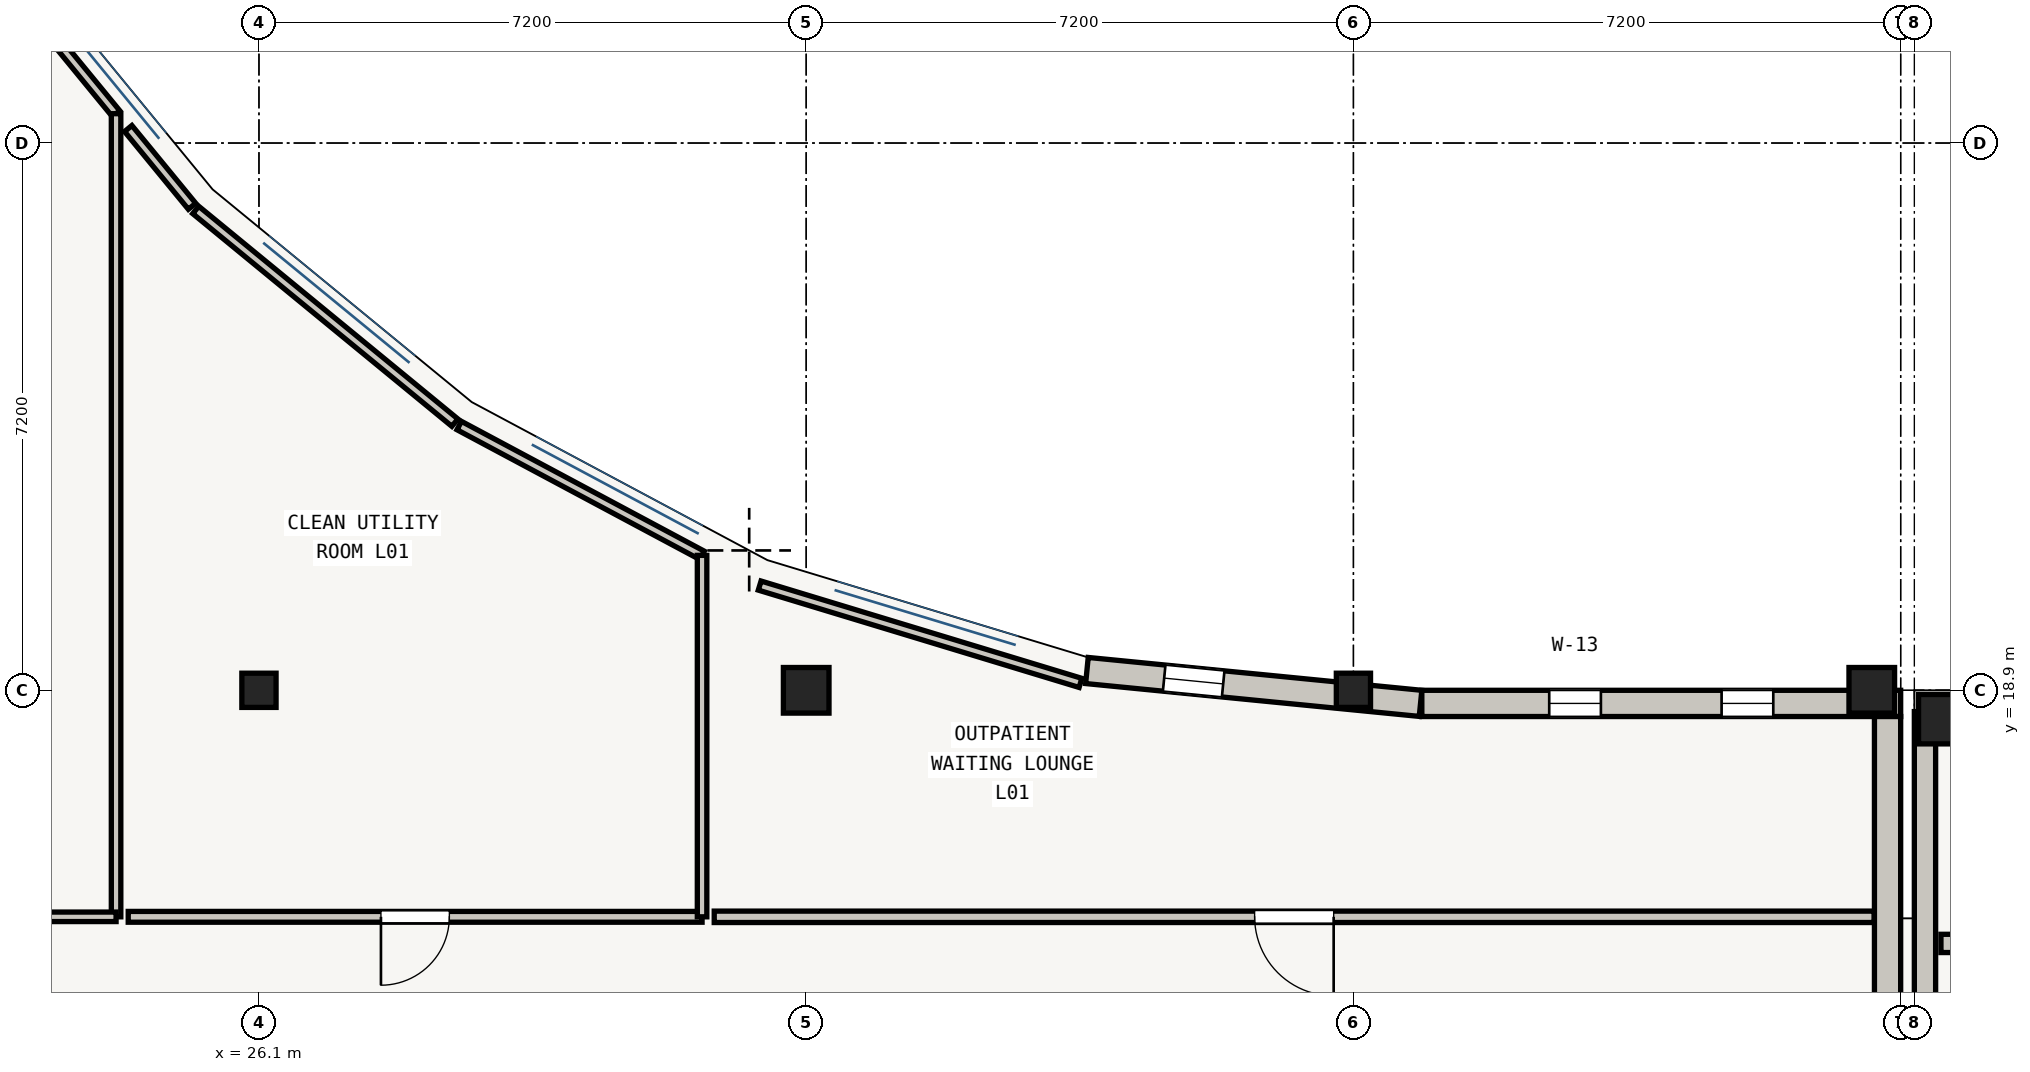
"""IFC4 building model, lengths in metres.
Left out: names, types, materials, properties, quantities, classifications, styles, units other than length and angle.
Written with IfcOpenShell. Run it as: python <this file> out.ifc"""

import sys

from ifc_helpers import new_model, si_unit, direction, frame, frame_2d, origin, origin_2d, place, context, subcontext, project, spatial, rectangle, extrude, element, fill, save


model = new_model("IFC4")
c1 = context("Model", 3, precision=1e-05, world=origin(), true_north=direction((0.0, 1.0)))
c2 = subcontext(c1, "Body", "Model", "MODEL_VIEW")
j1 = project(units=[si_unit("LENGTHUNIT", "METRE"), si_unit("PLANEANGLEUNIT", "RADIAN")], contexts=[c1])
p1 = place(None, origin())
s1 = spatial("IfcSite", under=j1, at=p1, CompositionType="ELEMENT")
p2 = place(p1, origin())
s2 = spatial("IfcBuilding", under=s1, at=p2, CompositionType="ELEMENT")
p3 = place(p2, frame((0.0, 0.0, 4.5)))
s3 = spatial("IfcBuildingStorey", under=s2, at=p3, CompositionType="ELEMENT", Elevation=4.5)
p4 = place(p3, frame((26.1, 18.9, 0.0), z_axis=(0.0, 0.0, 1.0), x_axis=(1.0, 0.0, 0.0)))
e1 = element("IfcColumn", 1, at=p4, inside=s3, PredefinedType="COLUMN", context=c2, shape_type="SweptSolid", body=[
    extrude(rectangle(XDim=0.45, YDim=0.45, at=origin_2d()), origin(), (0.0, 0.0, 1.0), 3.92),
])
p5 = place(p3, frame((33.3, 18.9, 0.0), z_axis=(0.0, 0.0, 1.0), x_axis=(1.0, 0.0, 0.0)))
e2 = element("IfcColumn", 2, at=p5, inside=s3, PredefinedType="COLUMN", context=c2, shape_type="SweptSolid", body=[
    extrude(rectangle(XDim=0.6, YDim=0.6, at=origin_2d()), origin(), (0.0, 0.0, 1.0), 3.92),
])
p6 = place(p3, frame((40.5, 18.9, 0.0), z_axis=(0.0, 0.0, 1.0), x_axis=(1.0, 0.0, 0.0)))
e3 = element("IfcColumn", 3, at=p6, inside=s3, PredefinedType="COLUMN", context=c2, shape_type="SweptSolid", body=[
    extrude(rectangle(XDim=0.45, YDim=0.45, at=origin_2d()), origin(), (0.0, 0.0, 1.0), 3.92),
])
p7 = place(p3, frame((47.32, 18.9, 0.0), z_axis=(0.0, 0.0, 1.0), x_axis=(1.0, 0.0, 0.0)))
e4 = element("IfcColumn", 4, at=p7, inside=s3, PredefinedType="COLUMN", context=c2, shape_type="SweptSolid", body=[
    extrude(rectangle(XDim=0.6, YDim=0.6, at=origin_2d()), origin(), (0.0, 0.0, 1.0), 3.92),
])
p8 = place(p3, frame((48.26, 18.52, 0.0), z_axis=(0.0, 0.0, 1.0), x_axis=(1.0, 0.0, 0.0)))
e5 = element("IfcColumn", 5, at=p8, inside=s3, PredefinedType="COLUMN", context=c2, shape_type="SweptSolid", body=[
    extrude(rectangle(XDim=0.65, YDim=0.65, at=origin_2d()), origin(), (0.0, 0.0, 1.0), 3.96),
])
p9 = place(p3, frame((36.994, 19.161, 0.0), z_axis=(0.0, 0.0, 1.0), x_axis=(0.995183522218, -0.098029368588, 0.0)))
e6 = element("IfcWall", 6, at=p9, inside=s3, PredefinedType="SOLIDWALL", context=c2, shape_type="SweptSolid", body=[
    extrude(rectangle(XDim=4.411, YDim=0.345, at=frame_2d((2.205, 0.0))), origin(), (0.0, 0.0, 1.0), 2.955),
])
p10 = place(p9, frame((1.021, 0.0, 0.6)))
e7 = element("IfcOpeningElement", 7, at=p10, cuts=e6, PredefinedType="OPENING", context=c2, shape_type="SweptSolid", body=[
    extrude(rectangle(XDim=0.78, YDim=1.95, at=frame_2d((0.39, 0.975))), frame((0.0, 0.172, 0.0), z_axis=(0.0, -1.0, 0.0), x_axis=(1.0, 0.0, 0.0)), (0.0, 0.0, 1.0), 0.345),
])
p11 = place(p3, frame((41.4, 18.728, 0.0), z_axis=(0.0, 0.0, 1.0), x_axis=(1.0, 0.0, 0.0)))
e8 = element("IfcWall", 8, at=p11, inside=s3, PredefinedType="SOLIDWALL", context=c2, shape_type="SweptSolid", body=[
    extrude(rectangle(XDim=6.3, YDim=0.345, at=frame_2d((3.15, 0.0))), origin(), (0.0, 0.0, 1.0), 3.355),
])
p12 = place(p11, frame((1.676, 0.0, 0.55)))
e9 = element("IfcOpeningElement", 9, at=p12, cuts=e8, PredefinedType="OPENING", context=c2, shape_type="SweptSolid", body=[
    extrude(rectangle(XDim=0.68, YDim=2.22, at=frame_2d((0.34, 1.11))), frame((0.0, 0.172, 0.0), z_axis=(0.0, -1.0, 0.0), x_axis=(1.0, 0.0, 0.0)), (0.0, 0.0, 1.0), 0.345),
])
p13 = place(p11, frame((3.944, 0.0, 0.55)))
e10 = element("IfcOpeningElement", 10, at=p13, cuts=e8, PredefinedType="OPENING", context=c2, shape_type="SweptSolid", body=[
    extrude(rectangle(XDim=0.68, YDim=2.22, at=frame_2d((0.34, 1.11))), frame((0.0, 0.172, 0.0), z_axis=(0.0, -1.0, 0.0), x_axis=(1.0, 0.0, 0.0)), (0.0, 0.0, 1.0), 0.345),
])
p14 = place(p3, frame((47.528, 18.555, 0.0), z_axis=(0.0, 0.0, 1.0), x_axis=(0.0, -1.0, 0.0)))
e11 = element("IfcWall", 11, at=p14, inside=s3, PredefinedType="SOLIDWALL", context=c2, shape_type="SweptSolid", body=[
    extrude(rectangle(XDim=6.855, YDim=0.345, at=frame_2d((3.427, 0.0))), origin(), (0.0, 0.0, 1.0), 3.325),
])
p15 = place(p3, frame((48.02, 11.7, 0.0), z_axis=(0.0, 0.0, 1.0), x_axis=(0.0, 1.0, 0.0)))
e12 = element("IfcWall", 12, at=p15, inside=s3, PredefinedType="STANDARD", context=c2, shape_type="SweptSolid", body=[
    extrude(rectangle(XDim=6.92, YDim=0.28, at=frame_2d((3.46, 0.0))), origin(), (0.0, 0.0, 1.0), 3.995),
])
p16 = place(p3, frame((22.421, 28.678, 0.0), z_axis=(0.0, 0.0, 1.0), x_axis=(0.634381268995, -0.773020313801, 0.0)))
e13 = element("IfcWall", 13, at=p16, inside=s3, PredefinedType="PARTITIONING", context=c2, shape_type="SweptSolid", body=[
    extrude(rectangle(XDim=2.835, YDim=0.125, at=frame_2d((1.417, 0.0))), origin(), (0.0, 0.0, 1.0), 2.94),
])
p17 = place(p3, frame((24.22, 26.486, 0.0), z_axis=(0.0, 0.0, 1.0), x_axis=(0.0, -1.0, 0.0)))
e14 = element("IfcWall", 14, at=p17, inside=s3, PredefinedType="PARTITIONING", context=c2, shape_type="SweptSolid", body=[
    extrude(rectangle(XDim=10.566, YDim=0.125, at=frame_2d((5.283, 0.0))), origin(), (0.0, 0.0, 1.0), 2.94),
])
p18 = place(p3, frame((24.22, 15.92, 0.0), z_axis=(0.0, 0.0, 1.0), x_axis=(-1.0, 0.0, 0.0)))
e15 = element("IfcWall", 15, at=p18, inside=s3, PredefinedType="PARTITIONING", context=c2, shape_type="SweptSolid", body=[
    extrude(rectangle(XDim=7.55, YDim=0.125, at=frame_2d((3.775, 0.0))), origin(), (0.0, 0.0, 1.0), 2.94),
])
p19 = place(p3, frame((31.93, 15.92, 0.0), z_axis=(0.0, 0.0, 1.0), x_axis=(-1.0, 0.0, 0.0)))
e16 = element("IfcWall", 16, at=p19, inside=s3, PredefinedType="PARTITIONING", context=c2, shape_type="SweptSolid", body=[
    extrude(rectangle(XDim=7.55, YDim=0.142, at=frame_2d((3.775, 0.0))), origin(), (0.0, 0.0, 1.0), 2.94),
])
p20 = place(p19, frame((3.325, 0.0, 0.0)))
e17 = element("IfcOpeningElement", 17, at=p20, cuts=e16, PredefinedType="OPENING", context=c2, shape_type="SweptSolid", body=[
    extrude(rectangle(XDim=0.9, YDim=2.05, at=frame_2d((0.45, 1.025))), frame((0.0, 0.071, 0.0), z_axis=(0.0, -1.0, 0.0), x_axis=(1.0, 0.0, 0.0)), (0.0, 0.0, 1.0), 0.142),
])
p21 = place(p3, frame((25.268, 25.219, 0.0), z_axis=(0.0, 0.0, 1.0), x_axis=(0.773026739032, -0.634373439499, 0.0)))
e18 = element("IfcWall", 18, at=p21, inside=s3, PredefinedType="PARTITIONING", context=c2, shape_type="SweptSolid", body=[
    extrude(rectangle(XDim=4.411, YDim=0.125, at=frame_2d((2.206, 0.0))), origin(), (0.0, 0.0, 1.0), 2.94),
])
p22 = place(p3, frame((28.735, 22.383, 0.0), z_axis=(0.0, 0.0, 1.0), x_axis=(0.881912348796, -0.471413416273, 0.0)))
e19 = element("IfcWall", 19, at=p22, inside=s3, PredefinedType="PARTITIONING", context=c2, shape_type="SweptSolid", body=[
    extrude(rectangle(XDim=3.623, YDim=0.125, at=frame_2d((1.812, 0.0))), origin(), (0.0, 0.0, 1.0), 2.94),
])
p23 = place(p3, frame((31.93, 20.675, 0.0), z_axis=(0.0, 0.0, 1.0), x_axis=(0.0, -1.0, 0.0)))
e20 = element("IfcWall", 20, at=p23, inside=s3, PredefinedType="PARTITIONING", context=c2, shape_type="SweptSolid", body=[
    extrude(rectangle(XDim=4.755, YDim=0.125, at=frame_2d((2.378, 0.0))), origin(), (0.0, 0.0, 1.0), 2.94),
])
p24 = place(p3, frame((24.38, 26.291, 0.0), z_axis=(0.0, 0.0, 1.0), x_axis=(0.634432512687, -0.77297825768, 0.0)))
e21 = element("IfcWall", 21, at=p24, inside=s3, PredefinedType="PARTITIONING", context=c2, shape_type="SweptSolid", body=[
    extrude(rectangle(XDim=1.323, YDim=0.125, at=frame_2d((0.662, 0.0))), origin(), (0.0, 0.0, 1.0), 2.94),
])
p25 = place(p3, frame((47.35, 15.92, 0.0), z_axis=(0.0, 0.0, 1.0), x_axis=(-1.0, 0.0, 0.0)))
e22 = element("IfcWall", 22, at=p25, inside=s3, PredefinedType="PARTITIONING", context=c2, shape_type="SweptSolid", body=[
    extrude(rectangle(XDim=15.26, YDim=0.15, at=frame_2d((7.63, 0.0))), origin(), (0.0, 0.0, 1.0), 2.94),
])
p26 = place(p25, frame((7.11, 0.0, 0.0)))
e23 = element("IfcOpeningElement", 23, at=p26, cuts=e22, PredefinedType="OPENING", context=c2, shape_type="SweptSolid", body=[
    extrude(rectangle(XDim=1.04, YDim=2.05, at=frame_2d((0.52, 1.025))), frame((0.0, 0.075, 0.0), z_axis=(0.0, -1.0, 0.0), x_axis=(1.0, 0.0, 0.0)), (0.0, 0.0, 1.0), 0.15),
])
p27 = place(p3, frame((32.688, 20.278, 0.0), z_axis=(0.0, 0.0, 1.0), x_axis=(0.956933582882, -0.290306937487, 0.0)))
e24 = element("IfcWall", 24, at=p27, inside=s3, PredefinedType="PARTITIONING", context=c2, shape_type="SweptSolid", body=[
    extrude(rectangle(XDim=4.411, YDim=0.125, at=frame_2d((2.206, 0.0))), origin(), (0.0, 0.0, 1.0), 2.94),
])
p28 = place(p3, frame((76.6, 15.57, 0.0), z_axis=(0.0, 0.0, 1.0), x_axis=(-1.0, 0.0, 0.0)))
e25 = element("IfcWall", 25, at=p28, inside=s3, PredefinedType="SOLIDWALL", context=c2, shape_type="SweptSolid", body=[
    extrude(rectangle(XDim=28.37, YDim=0.24, at=frame_2d((14.185, 0.0))), origin(), (0.0, 0.0, 1.0), 2.905),
])
p29 = place(p28, frame((13.51, 0.0, 0.0)))
e26 = element("IfcOpeningElement", 26, at=p29, cuts=e25, PredefinedType="OPENING", context=c2, shape_type="SweptSolid", body=[
    extrude(rectangle(XDim=1.35, YDim=2.1, at=frame_2d((0.675, 1.05))), frame((0.0, 0.12, 0.0), z_axis=(0.0, -1.0, 0.0), x_axis=(1.0, 0.0, 0.0)), (0.0, 0.0, 1.0), 0.24),
])
p30 = place(p3, frame((48.23, 18.55, 0.0), z_axis=(0.0, 0.0, 1.0), x_axis=(1.0, 0.0, 0.0)))
e27 = element("IfcWall", 27, at=p30, inside=s3, PredefinedType="PARTITIONING", context=c2, shape_type="SweptSolid", body=[
    extrude(rectangle(XDim=28.37, YDim=0.125, at=frame_2d((14.185, 0.0))), origin(), (0.0, 0.0, 1.0), 2.905),
])
p31 = place(p10, origin())
e28 = element("IfcWindow", 28, at=p31, inside=s3, PartitioningType="SINGLE_PANEL", PredefinedType="WINDOW", context=c2, shape_type="SweptSolid", body=[
    extrude(rectangle(XDim=0.78, YDim=1.95, at=frame_2d((0.39, 0.975))), frame((0.0, 0.03, 0.0), z_axis=(0.0, -1.0, 0.0), x_axis=(1.0, 0.0, 0.0)), (0.0, 0.0, 1.0), 0.06),
])
fill(e7, e28)
p32 = place(p12, origin())
e29 = element("IfcWindow", 29, at=p32, inside=s3, PartitioningType="SINGLE_PANEL", PredefinedType="WINDOW", context=c2, shape_type="SweptSolid", body=[
    extrude(rectangle(XDim=0.68, YDim=2.22, at=frame_2d((0.34, 1.11))), frame((0.0, 0.03, 0.0), z_axis=(0.0, -1.0, 0.0), x_axis=(1.0, 0.0, 0.0)), (0.0, 0.0, 1.0), 0.06),
])
fill(e9, e29)
p33 = place(p13, origin())
e30 = element("IfcWindow", 30, at=p33, inside=s3, PartitioningType="SINGLE_PANEL", PredefinedType="WINDOW", context=c2, shape_type="SweptSolid", body=[
    extrude(rectangle(XDim=0.68, YDim=2.22, at=frame_2d((0.34, 1.11))), frame((0.0, 0.03, 0.0), z_axis=(0.0, -1.0, 0.0), x_axis=(1.0, 0.0, 0.0)), (0.0, 0.0, 1.0), 0.06),
])
fill(e10, e30)
p34 = place(p20, origin())
e31 = element("IfcDoor", 31, at=p34, inside=s3, OperationType="SINGLE_SWING_RIGHT", PredefinedType="DOOR", context=c2, shape_type="SweptSolid", body=[
    extrude(rectangle(XDim=0.9, YDim=2.05, at=frame_2d((0.45, 1.025))), frame((0.0, 0.025, 0.0), z_axis=(0.0, -1.0, 0.0), x_axis=(1.0, 0.0, 0.0)), (0.0, 0.0, 1.0), 0.05),
])
fill(e17, e31)
p35 = place(p26, origin())
e32 = element("IfcDoor", 32, at=p35, inside=s3, OperationType="SINGLE_SWING_LEFT", PredefinedType="DOOR", context=c2, shape_type="SweptSolid", body=[
    extrude(rectangle(XDim=1.04, YDim=2.05, at=frame_2d((0.52, 1.025))), frame((0.0, 0.025, 0.0), z_axis=(0.0, -1.0, 0.0), x_axis=(1.0, 0.0, 0.0)), (0.0, 0.0, 1.0), 0.05),
])
fill(e23, e32)
save(model, sys.argv[1])
